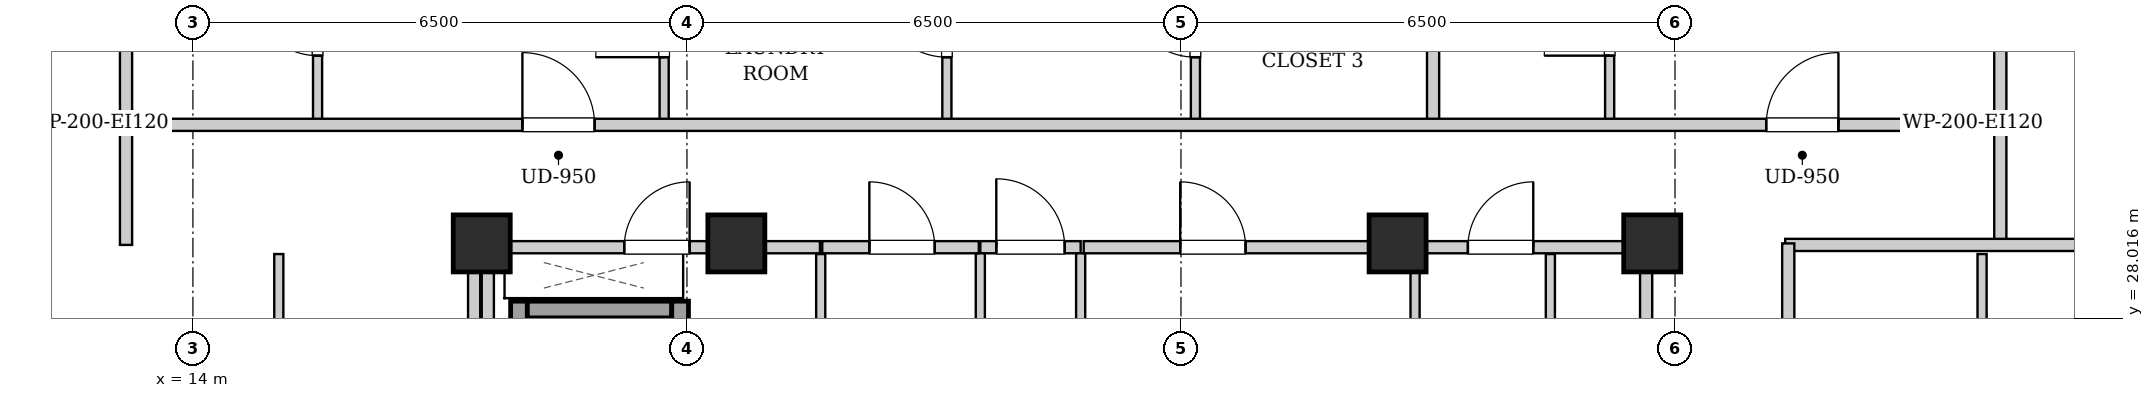
"""IFC4 building model, lengths in metres.
Left out: names, types, materials, properties, quantities, classifications, styles, units other than length and angle.
Written with IfcOpenShell. Run it as: python <this file> out.ifc"""

import sys

from ifc_helpers import new_model, si_unit, direction, frame, frame_2d, origin, origin_2d, place, context, subcontext, project, spatial, rectangle, extrude, element, fill, save


model = new_model("IFC4")
c1 = context("Model", 3, precision=1e-05, world=origin(), true_north=direction((0.0, 1.0)))
c2 = subcontext(c1, "Body", "Model", "MODEL_VIEW")
j1 = project(units=[si_unit("LENGTHUNIT", "METRE"), si_unit("PLANEANGLEUNIT", "RADIAN")], contexts=[c1])
p1 = place(None, origin())
s1 = spatial("IfcSite", under=j1, at=p1, CompositionType="ELEMENT")
p2 = place(p1, origin())
s2 = spatial("IfcBuilding", under=s1, at=p2, CompositionType="ELEMENT")
p3 = place(p2, frame((0.0, 0.0, 230.9)))
s3 = spatial("IfcBuildingStorey", under=s2, at=p3, CompositionType="ELEMENT", Elevation=230.9)
for number, where, z_axis, x_axis in (
    (1, (17.8, 29.0, 0.0), (0.0, 0.0, 1.0), (1.0, 0.0, 0.0)),
    (2, (21.15, 29.0, 0.0), (0.0, 0.0, 1.0), (1.0, 0.0, 0.0)),
    (3, (29.85, 29.0, 0.0), (0.0, 0.0, 1.0), (1.0, 0.0, 0.0)),
    (4, (33.2, 29.0, 0.0), (0.0, 0.0, 1.0), (1.0, 0.0, 0.0)),
):
    element("IfcColumn", number, at=place(p3, frame(where, z_axis=z_axis, x_axis=x_axis)), inside=s3, PredefinedType="COLUMN", context=c2, shape_type="SweptSolid", body=[
        extrude(rectangle(XDim=0.75, YDim=0.75, at=origin_2d()), origin(), (0.0, 0.0, 1.0), 3.4),
    ])
p4 = place(p3, frame((18.29, 24.1, 0.0), z_axis=(0.0, 0.0, 1.0), x_axis=(0.0, 1.0, 0.0)))
e5 = element("IfcWall", 5, at=p4, inside=s3, PredefinedType="SHEAR", context=c2, shape_type="SweptSolid", body=[
    extrude(rectangle(XDim=4.14, YDim=0.22, at=frame_2d((2.07, 0.0))), origin(), (0.0, 0.0, 1.0), 3.14),
])
p5 = place(p3, frame((18.4, 28.13, 0.0), z_axis=(0.0, 0.0, 1.0), x_axis=(1.0, 0.0, 0.0)))
e6 = element("IfcWall", 6, at=p5, inside=s3, PredefinedType="SHEAR", context=c2, shape_type="SweptSolid", body=[
    extrude(rectangle(XDim=1.9, YDim=0.22, at=frame_2d((0.95, 0.0))), origin(), (0.0, 0.0, 1.0), 3.14),
])
p6 = place(p3, frame((20.41, 26.06, 0.0), z_axis=(0.0, 0.0, 1.0), x_axis=(0.0, 1.0, 0.0)))
e7 = element("IfcWall", 7, at=p6, inside=s3, PredefinedType="SHEAR", context=c2, shape_type="SweptSolid", body=[
    extrude(rectangle(XDim=2.18, YDim=0.22, at=frame_2d((1.09, 0.0))), origin(), (0.0, 0.0, 1.0), 3.14),
])
p7 = place(p6, frame((0.54, 0.0, 0.0)))
e8 = element("IfcOpeningElement", 8, at=p7, cuts=e7, PredefinedType="OPENING", context=c2, shape_type="SweptSolid", body=[
    extrude(rectangle(XDim=1.1, YDim=2.15, at=frame_2d((0.55, 1.075))), frame((0.0, 0.12, 0.0), z_axis=(0.0, -1.0, 0.0), x_axis=(1.0, 0.0, 0.0)), (0.0, 0.0, 1.0), 0.24),
])
for number, where, z_axis, x_axis in (
    (9, (17.88, 24.12, 0.0), (0.0, 0.0, 1.0), (0.0, 1.0, 0.0)),
    (10, (33.12, 24.12, 0.0), (0.0, 0.0, 1.0), (0.0, 1.0, 0.0)),
):
    element("IfcWall", number, at=place(p3, frame(where, z_axis=z_axis, x_axis=x_axis)), inside=s3, PredefinedType="PARTITIONING", context=c2, shape_type="SweptSolid", body=[
        extrude(rectangle(XDim=4.76, YDim=0.16, at=frame_2d((2.38, 0.0))), origin(), (0.0, 0.0, 1.0), 3.14),
    ])
p8 = place(p3, frame((24.36, 28.95, 0.0), z_axis=(0.0, 0.0, 1.0), x_axis=(1.0, 0.0, 0.0)))
e11 = element("IfcWall", 11, at=p8, inside=s3, PredefinedType="PARTITIONING", context=c2, shape_type="SweptSolid", body=[
    extrude(rectangle(XDim=1.32, YDim=0.16, at=frame_2d((0.66, 0.0))), origin(), (0.0, 0.0, 1.0), 2.668),
])
p9 = place(p8, frame((0.21, 0.0, 0.0)))
e12 = element("IfcOpeningElement", 12, at=p9, cuts=e11, PredefinedType="OPENING", context=c2, shape_type="SweptSolid", body=[
    extrude(rectangle(XDim=0.9, YDim=2.05, at=frame_2d((0.45, 1.025))), frame((0.0, 0.09, 0.0), z_axis=(0.0, -1.0, 0.0), x_axis=(1.0, 0.0, 0.0)), (0.0, 0.0, 1.0), 0.18),
])
p10 = place(p3, frame((17.96, 28.95, 0.0), z_axis=(0.0, 0.0, 1.0), x_axis=(1.0, 0.0, 0.0)))
e13 = element("IfcWall", 13, at=p10, inside=s3, PredefinedType="PARTITIONING", context=c2, shape_type="SweptSolid", body=[
    extrude(rectangle(XDim=4.29, YDim=0.16, at=frame_2d((2.145, 0.0))), origin(), (0.0, 0.0, 1.0), 2.668),
])
p11 = place(p10, frame((1.715, 0.0, 0.0)))
e14 = element("IfcOpeningElement", 14, at=p11, cuts=e13, PredefinedType="OPENING", context=c2, shape_type="SweptSolid", body=[
    extrude(rectangle(XDim=0.86, YDim=2.05, at=frame_2d((0.43, 1.025))), frame((0.0, 0.09, 0.0), z_axis=(0.0, -1.0, 0.0), x_axis=(1.0, 0.0, 0.0)), (0.0, 0.0, 1.0), 0.18),
])
for number, where, z_axis, x_axis in (
    (15, (24.36, 25.0, 0.0), (0.0, 0.0, 1.0), (0.0, 1.0, 0.0)),
    (16, (25.68, 25.0, 0.0), (0.0, 0.0, 1.0), (0.0, 1.0, 0.0)),
):
    element("IfcWall", number, at=place(p3, frame(where, z_axis=z_axis, x_axis=x_axis)), inside=s3, PredefinedType="PARTITIONING", context=c2, shape_type="SweptSolid", body=[
        extrude(rectangle(XDim=3.87, YDim=0.12, at=frame_2d((1.935, 0.0))), origin(), (0.0, 0.0, 1.0), 3.14),
    ])
p12 = place(p3, frame((30.08, 26.18, 0.0), z_axis=(0.0, 0.0, 1.0), x_axis=(0.0, 1.0, 0.0)))
e17 = element("IfcWall", 17, at=p12, inside=s3, PredefinedType="PARTITIONING", context=c2, shape_type="SweptSolid", body=[
    extrude(rectangle(XDim=2.68, YDim=0.12, at=frame_2d((1.34, 0.0))), origin(), (0.0, 0.0, 1.0), 3.14),
])
p13 = place(p3, frame((31.86, 26.2, 0.0), z_axis=(0.0, 0.0, 1.0), x_axis=(0.0, 1.0, 0.0)))
e18 = element("IfcWall", 18, at=p13, inside=s3, PredefinedType="PARTITIONING", context=c2, shape_type="SweptSolid", body=[
    extrude(rectangle(XDim=2.66, YDim=0.12, at=frame_2d((1.33, 0.0))), origin(), (0.0, 0.0, 1.0), 3.14),
])
p14 = place(p13, frame((0.92, 0.0, 0.0)))
e19 = element("IfcOpeningElement", 19, at=p14, cuts=e18, PredefinedType="OPENING", context=c2, shape_type="SweptSolid", body=[
    extrude(rectangle(XDim=0.86, YDim=2.05, at=frame_2d((0.43, 1.025))), frame((0.0, 0.07, 0.0), z_axis=(0.0, -1.0, 0.0), x_axis=(1.0, 0.0, 0.0)), (0.0, 0.0, 1.0), 0.14),
])
p15 = place(p3, frame((30.08, 28.95, 0.0), z_axis=(0.0, 0.0, 1.0), x_axis=(1.0, 0.0, 0.0)))
e20 = element("IfcWall", 20, at=p15, inside=s3, PredefinedType="PARTITIONING", context=c2, shape_type="SweptSolid", body=[
    extrude(rectangle(XDim=2.96, YDim=0.16, at=frame_2d((1.48, 0.0))), origin(), (0.0, 0.0, 1.0), 3.14),
])
p16 = place(p15, frame((0.695, 0.0, 0.0)))
e21 = element("IfcOpeningElement", 21, at=p16, cuts=e20, PredefinedType="OPENING", context=c2, shape_type="SweptSolid", body=[
    extrude(rectangle(XDim=0.86, YDim=2.05, at=frame_2d((0.43, 1.025))), frame((0.0, 0.09, 0.0), z_axis=(0.0, -1.0, 0.0), x_axis=(1.0, 0.0, 0.0)), (0.0, 0.0, 1.0), 0.18),
])
p17 = place(p3, frame((22.26, 25.0, 0.0), z_axis=(0.0, 0.0, 1.0), x_axis=(0.0, 1.0, 0.0)))
e22 = element("IfcWall", 22, at=p17, inside=s3, PredefinedType="PARTITIONING", context=c2, shape_type="SweptSolid", body=[
    extrude(rectangle(XDim=3.86, YDim=0.12, at=frame_2d((1.93, 0.0))), origin(), (0.0, 0.0, 1.0), 3.14),
])
p18 = place(p3, frame((22.28, 28.95, 0.0), z_axis=(0.0, 0.0, 1.0), x_axis=(1.0, 0.0, 0.0)))
e23 = element("IfcWall", 23, at=p18, inside=s3, PredefinedType="PARTITIONING", context=c2, shape_type="SweptSolid", body=[
    extrude(rectangle(XDim=2.06, YDim=0.16, at=frame_2d((1.03, 0.0))), origin(), (0.0, 0.0, 1.0), 2.668),
])
p19 = place(p18, frame((0.62, 0.0, 0.0)))
e24 = element("IfcOpeningElement", 24, at=p19, cuts=e23, PredefinedType="OPENING", context=c2, shape_type="SweptSolid", body=[
    extrude(rectangle(XDim=0.86, YDim=2.05, at=frame_2d((0.43, 1.025))), frame((0.0, 0.09, 0.0), z_axis=(0.0, -1.0, 0.0), x_axis=(1.0, 0.0, 0.0)), (0.0, 0.0, 1.0), 0.18),
])
p20 = place(p3, frame((25.72, 28.95, 0.0), z_axis=(0.0, 0.0, 1.0), x_axis=(1.0, 0.0, 0.0)))
e25 = element("IfcWall", 25, at=p20, inside=s3, PredefinedType="PARTITIONING", context=c2, shape_type="SweptSolid", body=[
    extrude(rectangle(XDim=4.32, YDim=0.16, at=frame_2d((2.16, 0.0))), origin(), (0.0, 0.0, 1.0), 2.668),
])
p21 = place(p20, frame((1.27, 0.0, 0.0)))
e26 = element("IfcOpeningElement", 26, at=p21, cuts=e25, PredefinedType="OPENING", context=c2, shape_type="SweptSolid", body=[
    extrude(rectangle(XDim=0.86, YDim=2.05, at=frame_2d((0.43, 1.025))), frame((0.0, 0.09, 0.0), z_axis=(0.0, -1.0, 0.0), x_axis=(1.0, 0.0, 0.0)), (0.0, 0.0, 1.0), 0.18),
])
for number, where, z_axis, x_axis in (
    (27, (13.12, 28.98, 0.0), (0.0, 0.0, 1.0), (0.0, 1.0, 0.0)),
    (28, (37.78, 28.98, 0.0), (0.0, 0.0, 1.0), (0.0, 1.0, 0.0)),
):
    element("IfcWall", number, at=place(p3, frame(where, z_axis=z_axis, x_axis=x_axis)), inside=s3, PredefinedType="PARTITIONING", context=c2, shape_type="SweptSolid", body=[
        extrude(rectangle(XDim=1.58, YDim=0.16, at=frame_2d((0.79, 0.0))), origin(), (0.0, 0.0, 1.0), 3.14),
    ])
p22 = place(p3, frame((34.95, 28.98, 0.0), z_axis=(0.0, 0.0, 1.0), x_axis=(1.0, 0.0, 0.0)))
e29 = element("IfcWall", 29, at=p22, inside=s3, PredefinedType="PARTITIONING", context=c2, shape_type="SweptSolid", body=[
    extrude(rectangle(XDim=5.07, YDim=0.16, at=frame_2d((2.535, 0.0))), origin(), (0.0, 0.0, 1.0), 2.668),
])
p23 = place(p3, frame((13.12, 30.6, 0.0), z_axis=(0.0, 0.0, 1.0), x_axis=(0.0, 1.0, 0.0)))
e30 = element("IfcWall", 30, at=p23, inside=s3, PredefinedType="PARTITIONING", context=c2, shape_type="SweptSolid", body=[
    extrude(rectangle(XDim=2.66, YDim=0.16, at=frame_2d((1.33, 0.0))), origin(), (0.0, 0.0, 1.0), 3.14),
])
p24 = place(p3, frame((15.64, 30.6, 0.0), z_axis=(0.0, 0.0, 1.0), x_axis=(0.0, 1.0, 0.0)))
e31 = element("IfcWall", 31, at=p24, inside=s3, PredefinedType="PARTITIONING", context=c2, shape_type="SweptSolid", body=[
    extrude(rectangle(XDim=2.6, YDim=0.12, at=frame_2d((1.3, 0.0))), origin(), (0.0, 0.0, 1.0), 3.14),
])
p25 = place(p24, frame((0.87, 0.0, 0.0)))
e32 = element("IfcOpeningElement", 32, at=p25, cuts=e31, PredefinedType="OPENING", context=c2, shape_type="SweptSolid", body=[
    extrude(rectangle(XDim=0.86, YDim=2.05, at=frame_2d((0.43, 1.025))), frame((0.0, 0.07, 0.0), z_axis=(0.0, -1.0, 0.0), x_axis=(1.0, 0.0, 0.0)), (0.0, 0.0, 1.0), 0.14),
])
p26 = place(p3, frame((20.2, 30.6, 0.0), z_axis=(0.0, 0.0, 1.0), x_axis=(0.0, 1.0, 0.0)))
e33 = element("IfcWall", 33, at=p26, inside=s3, PredefinedType="PARTITIONING", context=c2, shape_type="SweptSolid", body=[
    extrude(rectangle(XDim=2.6, YDim=0.12, at=frame_2d((1.3, 0.0))), origin(), (0.0, 0.0, 1.0), 3.14),
])
p27 = place(p26, frame((0.85, 0.0, 0.0)))
e34 = element("IfcOpeningElement", 34, at=p27, cuts=e33, PredefinedType="OPENING", context=c2, shape_type="SweptSolid", body=[
    extrude(rectangle(XDim=0.9, YDim=2.05, at=frame_2d((0.45, 1.025))), frame((0.0, 0.07, 0.0), z_axis=(0.0, -1.0, 0.0), x_axis=(1.0, 0.0, 0.0)), (0.0, 0.0, 1.0), 0.14),
])
p28 = place(p3, frame((23.92, 30.6, 0.0), z_axis=(0.0, 0.0, 1.0), x_axis=(0.0, 1.0, 0.0)))
e35 = element("IfcWall", 35, at=p28, inside=s3, PredefinedType="PARTITIONING", context=c2, shape_type="SweptSolid", body=[
    extrude(rectangle(XDim=2.6, YDim=0.12, at=frame_2d((1.3, 0.0))), origin(), (0.0, 0.0, 1.0), 3.14),
])
p29 = place(p28, frame((0.85, 0.0, 0.0)))
e36 = element("IfcOpeningElement", 36, at=p29, cuts=e35, PredefinedType="OPENING", context=c2, shape_type="SweptSolid", body=[
    extrude(rectangle(XDim=0.9, YDim=2.05, at=frame_2d((0.45, 1.025))), frame((0.0, 0.07, 0.0), z_axis=(0.0, -1.0, 0.0), x_axis=(1.0, 0.0, 0.0)), (0.0, 0.0, 1.0), 0.14),
])
p30 = place(p3, frame((27.19, 30.6, 0.0), z_axis=(0.0, 0.0, 1.0), x_axis=(0.0, 1.0, 0.0)))
e37 = element("IfcWall", 37, at=p30, inside=s3, PredefinedType="PARTITIONING", context=c2, shape_type="SweptSolid", body=[
    extrude(rectangle(XDim=2.6, YDim=0.12, at=frame_2d((1.3, 0.0))), origin(), (0.0, 0.0, 1.0), 3.14),
])
p31 = place(p30, frame((0.85, 0.0, 0.0)))
e38 = element("IfcOpeningElement", 38, at=p31, cuts=e37, PredefinedType="OPENING", context=c2, shape_type="SweptSolid", body=[
    extrude(rectangle(XDim=0.9, YDim=2.05, at=frame_2d((0.45, 1.025))), frame((0.0, 0.07, 0.0), z_axis=(0.0, -1.0, 0.0), x_axis=(1.0, 0.0, 0.0)), (0.0, 0.0, 1.0), 0.14),
])
p32 = place(p3, frame((37.78, 30.6, 0.0), z_axis=(0.0, 0.0, 1.0), x_axis=(0.0, 1.0, 0.0)))
e39 = element("IfcWall", 39, at=p32, inside=s3, PredefinedType="PARTITIONING", context=c2, shape_type="SweptSolid", body=[
    extrude(rectangle(XDim=2.66, YDim=0.16, at=frame_2d((1.33, 0.0))), origin(), (0.0, 0.0, 1.0), 3.14),
])
p33 = place(p3, frame((30.317, 30.6, 0.0), z_axis=(0.0, 0.0, 1.0), x_axis=(0.0, 1.0, 0.0)))
e40 = element("IfcWall", 40, at=p33, inside=s3, PredefinedType="PARTITIONING", context=c2, shape_type="SweptSolid", body=[
    extrude(rectangle(XDim=9.32, YDim=0.16, at=frame_2d((4.66, 0.0))), origin(), (0.0, 0.0, 1.0), 3.14),
])
p34 = place(p3, frame((32.64, 30.6, 0.0), z_axis=(0.0, 0.0, 1.0), x_axis=(0.0, 1.0, 0.0)))
e41 = element("IfcWall", 41, at=p34, inside=s3, PredefinedType="PARTITIONING", context=c2, shape_type="SweptSolid", body=[
    extrude(rectangle(XDim=2.6, YDim=0.12, at=frame_2d((1.3, 0.0))), origin(), (0.0, 0.0, 1.0), 3.14),
])
p35 = place(p34, frame((0.87, 0.0, 0.0)))
e42 = element("IfcOpeningElement", 42, at=p35, cuts=e41, PredefinedType="OPENING", context=c2, shape_type="SweptSolid", body=[
    extrude(rectangle(XDim=0.86, YDim=2.05, at=frame_2d((0.43, 1.025))), frame((0.0, 0.07, 0.0), z_axis=(0.0, -1.0, 0.0), x_axis=(1.0, 0.0, 0.0)), (0.0, 0.0, 1.0), 0.14),
])
p36 = place(p3, frame((15.13, 24.552, 0.0), z_axis=(0.0, 0.0, 1.0), x_axis=(0.0, 1.0, 0.0)))
e43 = element("IfcWall", 43, at=p36, inside=s3, PredefinedType="PARTITIONING", context=c2, shape_type="SweptSolid", body=[
    extrude(rectangle(XDim=4.308, YDim=0.12, at=frame_2d((2.154, 0.0))), origin(), (0.0, 0.0, 1.0), 3.14),
])
p37 = place(p36, frame((1.704, 0.0, 0.0)))
e44 = element("IfcOpeningElement", 44, at=p37, cuts=e43, PredefinedType="OPENING", context=c2, shape_type="SweptSolid", body=[
    extrude(rectangle(XDim=0.9, YDim=2.05, at=frame_2d((0.45, 1.025))), frame((0.0, 0.07, 0.0), z_axis=(0.0, -1.0, 0.0), x_axis=(1.0, 0.0, 0.0)), (0.0, 0.0, 1.0), 0.14),
])
p38 = place(p3, frame((37.54, 24.552, 0.0), z_axis=(0.0, 0.0, 1.0), x_axis=(0.0, 1.0, 0.0)))
e45 = element("IfcWall", 45, at=p38, inside=s3, PredefinedType="PARTITIONING", context=c2, shape_type="SweptSolid", body=[
    extrude(rectangle(XDim=4.308, YDim=0.12, at=frame_2d((2.154, 0.0))), origin(), (0.0, 0.0, 1.0), 3.14),
])
p39 = place(p38, frame((1.704, 0.0, 0.0)))
e46 = element("IfcOpeningElement", 46, at=p39, cuts=e45, PredefinedType="OPENING", context=c2, shape_type="SweptSolid", body=[
    extrude(rectangle(XDim=0.9, YDim=2.05, at=frame_2d((0.45, 1.025))), frame((0.0, 0.07, 0.0), z_axis=(0.0, -1.0, 0.0), x_axis=(1.0, 0.0, 0.0)), (0.0, 0.0, 1.0), 0.14),
])
p40 = place(p3, frame((13.15, 30.56, 0.0), z_axis=(0.0, 0.0, 1.0), x_axis=(1.0, 0.0, 0.0)))
e47 = element("IfcWall", 47, at=p40, inside=s3, PredefinedType="PARTITIONING", context=c2, shape_type="SweptSolid", body=[
    extrude(rectangle(XDim=24.6, YDim=0.16, at=frame_2d((12.3, 0.0))), origin(), (0.0, 0.0, 1.0), 3.14),
])
p41 = place(p40, frame((5.185, 0.0, 0.0)))
e48 = element("IfcOpeningElement", 48, at=p41, cuts=e47, PredefinedType="OPENING", context=c2, shape_type="SweptSolid", body=[
    extrude(rectangle(XDim=0.95, YDim=2.1, at=frame_2d((0.475, 1.05))), frame((0.0, 0.09, 0.0), z_axis=(0.0, -1.0, 0.0), x_axis=(1.0, 0.0, 0.0)), (0.0, 0.0, 1.0), 0.18),
])
p42 = place(p40, frame((21.55, 0.0, 0.0)))
e49 = element("IfcOpeningElement", 49, at=p42, cuts=e47, PredefinedType="OPENING", context=c2, shape_type="SweptSolid", body=[
    extrude(rectangle(XDim=0.95, YDim=2.1, at=frame_2d((0.475, 1.05))), frame((0.0, 0.09, 0.0), z_axis=(0.0, -1.0, 0.0), x_axis=(1.0, 0.0, 0.0)), (0.0, 0.0, 1.0), 0.18),
])
p43 = place(p3, frame((17.7, 15.02, 0.0), z_axis=(0.0, 0.0, 1.0), x_axis=(0.0, 1.0, 0.0)))
e50 = element("IfcWall", 50, at=p43, inside=s3, PredefinedType="PARTITIONING", context=c2, shape_type="SweptSolid", body=[
    extrude(rectangle(XDim=13.98, YDim=0.16, at=frame_2d((6.99, 0.0))), origin(), (0.0, 0.0, 1.0), 3.14),
])
p44 = place(p3, frame((34.99, 15.07, 0.0), z_axis=(0.0, 0.0, 1.0), x_axis=(0.0, 1.0, 0.0)))
e51 = element("IfcWall", 51, at=p44, inside=s3, PredefinedType="PARTITIONING", context=c2, shape_type="SweptSolid", body=[
    extrude(rectangle(XDim=13.93, YDim=0.16, at=frame_2d((6.965, 0.0))), origin(), (0.0, 0.0, 1.0), 3.14),
])
p45 = place(p44, frame((4.385, 0.0, 0.0)))
e52 = element("IfcOpeningElement", 52, at=p45, cuts=e51, PredefinedType="OPENING", context=c2, shape_type="SweptSolid", body=[
    extrude(rectangle(XDim=0.95, YDim=2.1, at=frame_2d((0.475, 1.05))), frame((0.0, 0.09, 0.0), z_axis=(0.0, -1.0, 0.0), x_axis=(1.0, 0.0, 0.0)), (0.0, 0.0, 1.0), 0.18),
])
p46 = place(p9, origin())
e53 = element("IfcDoor", 53, at=p46, inside=s3, OperationType="SINGLE_SWING_LEFT", PredefinedType="DOOR", context=c2, shape_type="SweptSolid", body=[
    extrude(rectangle(XDim=0.9, YDim=2.05, at=frame_2d((0.45, 1.025))), frame((0.0, 0.025, 0.0), z_axis=(0.0, -1.0, 0.0), x_axis=(1.0, 0.0, 0.0)), (0.0, 0.0, 1.0), 0.05),
])
fill(e12, e53)
p47 = place(p11, origin())
e54 = element("IfcDoor", 54, at=p47, inside=s3, OperationType="SINGLE_SWING_RIGHT", PredefinedType="DOOR", context=c2, shape_type="SweptSolid", body=[
    extrude(rectangle(XDim=0.86, YDim=2.05, at=frame_2d((0.43, 1.025))), frame((0.0, 0.025, 0.0), z_axis=(0.0, -1.0, 0.0), x_axis=(1.0, 0.0, 0.0)), (0.0, 0.0, 1.0), 0.05),
])
fill(e14, e54)
p48 = place(p16, origin())
e55 = element("IfcDoor", 55, at=p48, inside=s3, OperationType="SINGLE_SWING_RIGHT", PredefinedType="DOOR", context=c2, shape_type="SweptSolid", body=[
    extrude(rectangle(XDim=0.86, YDim=2.05, at=frame_2d((0.43, 1.025))), frame((0.0, 0.025, 0.0), z_axis=(0.0, -1.0, 0.0), x_axis=(1.0, 0.0, 0.0)), (0.0, 0.0, 1.0), 0.05),
])
fill(e21, e55)
p49 = place(p19, origin())
e56 = element("IfcDoor", 56, at=p49, inside=s3, OperationType="SINGLE_SWING_LEFT", PredefinedType="DOOR", context=c2, shape_type="SweptSolid", body=[
    extrude(rectangle(XDim=0.86, YDim=2.05, at=frame_2d((0.43, 1.025))), frame((0.0, 0.025, 0.0), z_axis=(0.0, -1.0, 0.0), x_axis=(1.0, 0.0, 0.0)), (0.0, 0.0, 1.0), 0.05),
])
fill(e24, e56)
p50 = place(p21, origin())
e57 = element("IfcDoor", 57, at=p50, inside=s3, OperationType="SINGLE_SWING_LEFT", PredefinedType="DOOR", context=c2, shape_type="SweptSolid", body=[
    extrude(rectangle(XDim=0.86, YDim=2.05, at=frame_2d((0.43, 1.025))), frame((0.0, 0.025, 0.0), z_axis=(0.0, -1.0, 0.0), x_axis=(1.0, 0.0, 0.0)), (0.0, 0.0, 1.0), 0.05),
])
fill(e26, e57)
p51 = place(p25, origin())
e58 = element("IfcDoor", 58, at=p51, inside=s3, OperationType="SINGLE_SWING_RIGHT", PredefinedType="DOOR", context=c2, shape_type="SweptSolid", body=[
    extrude(rectangle(XDim=0.86, YDim=2.05, at=frame_2d((0.43, 1.025))), frame((0.0, 0.025, 0.0), z_axis=(0.0, -1.0, 0.0), x_axis=(1.0, 0.0, 0.0)), (0.0, 0.0, 1.0), 0.05),
])
fill(e32, e58)
p52 = place(p27, origin())
e59 = element("IfcDoor", 59, at=p52, inside=s3, OperationType="SINGLE_SWING_LEFT", PredefinedType="DOOR", context=c2, shape_type="SweptSolid", body=[
    extrude(rectangle(XDim=0.9, YDim=2.05, at=frame_2d((0.45, 1.025))), frame((0.0, 0.025, 0.0), z_axis=(0.0, -1.0, 0.0), x_axis=(1.0, 0.0, 0.0)), (0.0, 0.0, 1.0), 0.05),
])
fill(e34, e59)
p53 = place(p29, origin())
e60 = element("IfcDoor", 60, at=p53, inside=s3, OperationType="SINGLE_SWING_RIGHT", PredefinedType="DOOR", context=c2, shape_type="SweptSolid", body=[
    extrude(rectangle(XDim=0.9, YDim=2.05, at=frame_2d((0.45, 1.025))), frame((0.0, 0.025, 0.0), z_axis=(0.0, -1.0, 0.0), x_axis=(1.0, 0.0, 0.0)), (0.0, 0.0, 1.0), 0.05),
])
fill(e36, e60)
p54 = place(p31, origin())
e61 = element("IfcDoor", 61, at=p54, inside=s3, OperationType="SINGLE_SWING_RIGHT", PredefinedType="DOOR", context=c2, shape_type="SweptSolid", body=[
    extrude(rectangle(XDim=0.9, YDim=2.05, at=frame_2d((0.45, 1.025))), frame((0.0, 0.025, 0.0), z_axis=(0.0, -1.0, 0.0), x_axis=(1.0, 0.0, 0.0)), (0.0, 0.0, 1.0), 0.05),
])
fill(e38, e61)
p55 = place(p35, origin())
e62 = element("IfcDoor", 62, at=p55, inside=s3, OperationType="SINGLE_SWING_LEFT", PredefinedType="DOOR", context=c2, shape_type="SweptSolid", body=[
    extrude(rectangle(XDim=0.86, YDim=2.05, at=frame_2d((0.43, 1.025))), frame((0.0, 0.025, 0.0), z_axis=(0.0, -1.0, 0.0), x_axis=(1.0, 0.0, 0.0)), (0.0, 0.0, 1.0), 0.05),
])
fill(e42, e62)
p56 = place(p41, origin())
e63 = element("IfcDoor", 63, at=p56, inside=s3, OperationType="SINGLE_SWING_LEFT", PredefinedType="DOOR", context=c2, shape_type="SweptSolid", body=[
    extrude(rectangle(XDim=0.95, YDim=2.1, at=frame_2d((0.475, 1.05))), frame((0.0, 0.025, 0.0), z_axis=(0.0, -1.0, 0.0), x_axis=(1.0, 0.0, 0.0)), (0.0, 0.0, 1.0), 0.05),
])
fill(e48, e63)
p57 = place(p42, origin())
e64 = element("IfcDoor", 64, at=p57, inside=s3, OperationType="SINGLE_SWING_RIGHT", PredefinedType="DOOR", context=c2, shape_type="SweptSolid", body=[
    extrude(rectangle(XDim=0.95, YDim=2.1, at=frame_2d((0.475, 1.05))), frame((0.0, 0.025, 0.0), z_axis=(0.0, -1.0, 0.0), x_axis=(1.0, 0.0, 0.0)), (0.0, 0.0, 1.0), 0.05),
])
fill(e49, e64)
save(model, sys.argv[1])
